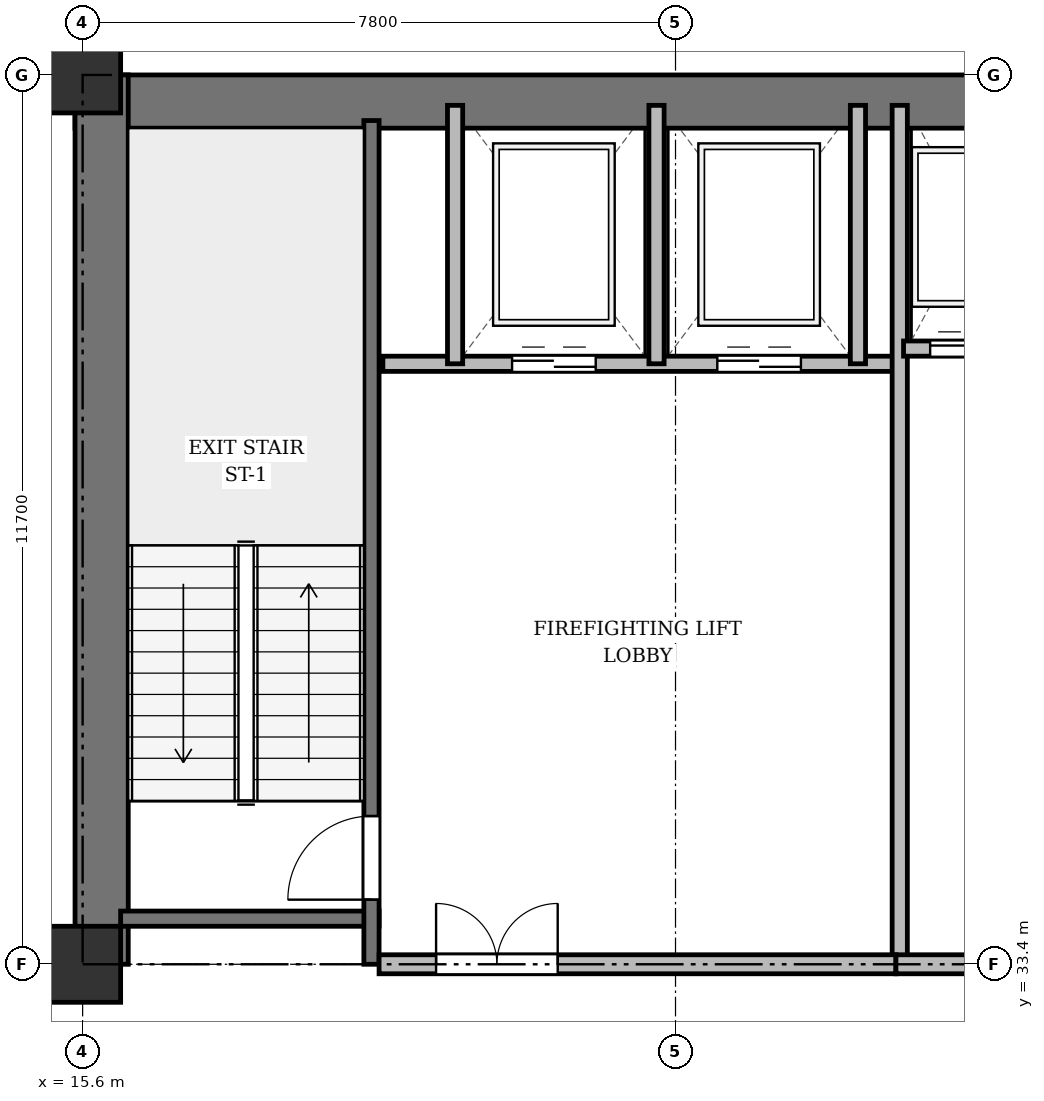
"""IFC4 building model, lengths in metres.
Left out: names, types, materials, properties, quantities, classifications, styles, units other than length and angle.
Written with IfcOpenShell. Run it as: python <this file> out.ifc"""

import sys

from ifc_helpers import new_model, si_unit, direction, frame, frame_2d, origin, origin_2d, place, context, subcontext, project, spatial, rectangle, extrude, source, transform, mapped, element, fill, save


model = new_model("IFC4")
c1 = context("Model", 3, precision=1e-05, world=origin(), true_north=direction((0.0, 1.0)))
c2 = subcontext(c1, "Body", "Model", "MODEL_VIEW")
j1 = project(units=[si_unit("LENGTHUNIT", "METRE"), si_unit("PLANEANGLEUNIT", "RADIAN")], contexts=[c1])
p1 = place(None, origin())
s1 = spatial("IfcSite", under=j1, at=p1, CompositionType="ELEMENT")
p2 = place(p1, origin())
s2 = spatial("IfcBuilding", under=s1, at=p2, CompositionType="ELEMENT")
p3 = place(p2, frame((0.0, 0.0, 14.2)))
s3 = spatial("IfcBuildingStorey", under=s2, at=p3, CompositionType="ELEMENT", Elevation=14.2)
m1 = source(origin(), c2, "Body", "SweptSolid", [
    extrude(rectangle(XDim=1.0, YDim=1.0, at=origin_2d()), origin(), (0.0, 0.0, 1.0), 4.5),
])
for number, where, z_axis, x_axis in (
    (1, (15.6, 33.4, 0.0), (0.0, 0.0, 1.0), (1.0, 0.0, 0.0)),
    (2, (15.6, 45.1, 0.0), (0.0, 0.0, 1.0), (1.0, 0.0, 0.0)),
):
    element("IfcColumn", number, at=place(p3, frame(where, z_axis=z_axis, x_axis=x_axis)), inside=s3, PredefinedType="COLUMN", context=c2, shape_type="MappedRepresentation", body=[
        mapped(m1, transform((0.0, 0.0, 0.0), x_axis=(1.0, 0.0, 0.0), y_axis=(0.0, 1.0, 0.0), z_axis=(0.0, 0.0, 1.0), scale=1.0)),
    ])
p4 = place(p3, frame((15.5, 44.75, 0.0), z_axis=(0.0, 0.0, 1.0), x_axis=(1.0, 0.0, 0.0)))
e3 = element("IfcWall", 3, at=p4, inside=s3, PredefinedType="SHEAR", context=c2, shape_type="SweptSolid", body=[
    extrude(rectangle(XDim=43.4, YDim=0.7, at=frame_2d((21.7, 0.0))), origin(), (0.0, 0.0, 1.0), 4.15),
])
p5 = place(p3, frame((15.85, 33.4, 0.0), z_axis=(0.0, 0.0, 1.0), x_axis=(0.0, 1.0, 0.0)))
e4 = element("IfcWall", 4, at=p5, inside=s3, PredefinedType="SHEAR", context=c2, shape_type="SweptSolid", body=[
    extrude(rectangle(XDim=11.7, YDim=0.7, at=frame_2d((5.85, 0.0))), origin(), (0.0, 0.0, 1.0), 4.15),
])
p6 = place(p3, frame((16.1, 34.0, 0.0), z_axis=(0.0, 0.0, 1.0), x_axis=(1.0, 0.0, 0.0)))
e5 = element("IfcWall", 5, at=p6, inside=s3, PredefinedType="SHEAR", context=c2, shape_type="SweptSolid", body=[
    extrude(rectangle(XDim=3.4, YDim=0.2, at=frame_2d((1.7, 0.0))), origin(), (0.0, 0.0, 1.0), 4.15),
])
p7 = place(p3, frame((19.4, 33.4, 0.0), z_axis=(0.0, 0.0, 1.0), x_axis=(0.0, 1.0, 0.0)))
e6 = element("IfcWall", 6, at=p7, inside=s3, PredefinedType="SHEAR", context=c2, shape_type="SweptSolid", body=[
    extrude(rectangle(XDim=11.1, YDim=0.2, at=frame_2d((5.55, 0.0))), origin(), (0.0, 0.0, 1.0), 4.15),
])
p8 = place(p7, frame((0.85, 0.0, 0.0)))
e7 = element("IfcOpeningElement", 7, at=p8, cuts=e6, PredefinedType="OPENING", context=c2, shape_type="SweptSolid", body=[
    extrude(rectangle(XDim=1.1, YDim=2.15, at=frame_2d((0.55, 1.075))), frame((0.0, 0.11, 0.0), z_axis=(0.0, -1.0, 0.0), x_axis=(1.0, 0.0, 0.0)), (0.0, 0.0, 1.0), 0.22),
])
p9 = place(p3, frame((19.55, 41.3, 0.0), z_axis=(0.0, 0.0, 1.0), x_axis=(1.0, 0.0, 0.0)))
e8 = element("IfcWall", 8, at=p9, inside=s3, PredefinedType="SOLIDWALL", context=c2, shape_type="SweptSolid", body=[
    extrude(rectangle(XDim=6.75, YDim=0.2, at=frame_2d((3.375, 0.0))), origin(), (0.0, 0.0, 1.0), 4.15),
])
p10 = place(p9, frame((1.7, 0.0, 0.0)))
e9 = element("IfcOpeningElement", 9, at=p10, cuts=e8, PredefinedType="OPENING", context=c2, shape_type="SweptSolid", body=[
    extrude(rectangle(XDim=1.1, YDim=2.15, at=frame_2d((0.55, 1.075))), frame((0.0, 0.11, 0.0), z_axis=(0.0, -1.0, 0.0), x_axis=(1.0, 0.0, 0.0)), (0.0, 0.0, 1.0), 0.22),
])
p11 = place(p9, frame((4.4, 0.0, 0.0)))
e10 = element("IfcOpeningElement", 10, at=p11, cuts=e8, PredefinedType="OPENING", context=c2, shape_type="SweptSolid", body=[
    extrude(rectangle(XDim=1.1, YDim=2.15, at=frame_2d((0.55, 1.075))), frame((0.0, 0.11, 0.0), z_axis=(0.0, -1.0, 0.0), x_axis=(1.0, 0.0, 0.0)), (0.0, 0.0, 1.0), 0.22),
])
for number, where, z_axis, x_axis in (
    (11, (20.5, 41.3, 0.0), (0.0, 0.0, 1.0), (0.0, 1.0, 0.0)),
    (12, (23.15, 41.3, 0.0), (0.0, 0.0, 1.0), (0.0, 1.0, 0.0)),
    (13, (25.8, 41.3, 0.0), (0.0, 0.0, 1.0), (0.0, 1.0, 0.0)),
):
    element("IfcWall", number, at=place(p3, frame(where, z_axis=z_axis, x_axis=x_axis)), inside=s3, PredefinedType="SOLIDWALL", context=c2, shape_type="SweptSolid", body=[
        extrude(rectangle(XDim=3.4, YDim=0.2, at=frame_2d((1.7, 0.0))), origin(), (0.0, 0.0, 1.0), 4.15),
    ])
p12 = place(p3, frame((26.35, 33.4, 0.0), z_axis=(0.0, 0.0, 1.0), x_axis=(0.0, 1.0, 0.0)))
e14 = element("IfcWall", 14, at=p12, inside=s3, PredefinedType="SOLIDWALL", context=c2, shape_type="SweptSolid", body=[
    extrude(rectangle(XDim=11.3, YDim=0.2, at=frame_2d((5.65, 0.0))), origin(), (0.0, 0.0, 1.0), 3.05),
])
p13 = place(p3, frame((19.5, 33.4, 0.0), z_axis=(0.0, 0.0, 1.0), x_axis=(1.0, 0.0, 0.0)))
e15 = element("IfcWall", 15, at=p13, inside=s3, PredefinedType="PARTITIONING", context=c2, shape_type="SweptSolid", body=[
    extrude(rectangle(XDim=6.8, YDim=0.25, at=frame_2d((3.4, 0.0))), origin(), (0.0, 0.0, 1.0), 3.05),
])
p14 = place(p13, frame((0.75, 0.0, 0.0)))
e16 = element("IfcOpeningElement", 16, at=p14, cuts=e15, PredefinedType="OPENING", context=c2, shape_type="SweptSolid", body=[
    extrude(rectangle(XDim=1.6, YDim=2.2, at=frame_2d((0.8, 1.1))), frame((0.0, 0.135, 0.0), z_axis=(0.0, -1.0, 0.0), x_axis=(1.0, 0.0, 0.0)), (0.0, 0.0, 1.0), 0.27),
])
p15 = place(p3, frame((26.4, 41.5, 0.0), z_axis=(0.0, 0.0, 1.0), x_axis=(1.0, 0.0, 0.0)))
e17 = element("IfcWall", 17, at=p15, inside=s3, PredefinedType="SOLIDWALL", context=c2, shape_type="SweptSolid", body=[
    extrude(rectangle(XDim=6.95, YDim=0.2, at=frame_2d((3.475, 0.0))), origin(), (0.0, 0.0, 1.0), 4.15),
])
p16 = place(p15, frame((0.35, 0.0, 0.0)))
e18 = element("IfcOpeningElement", 18, at=p16, cuts=e17, PredefinedType="OPENING", context=c2, shape_type="SweptSolid", body=[
    extrude(rectangle(XDim=1.05, YDim=2.15, at=frame_2d((0.525, 1.075))), frame((0.0, 0.11, 0.0), z_axis=(0.0, -1.0, 0.0), x_axis=(1.0, 0.0, 0.0)), (0.0, 0.0, 1.0), 0.22),
])
p17 = place(p15, frame((2.05, 0.0, 0.0)))
e19 = element("IfcOpeningElement", 19, at=p17, cuts=e17, PredefinedType="OPENING", context=c2, shape_type="SweptSolid", body=[
    extrude(rectangle(XDim=1.05, YDim=2.15, at=frame_2d((0.525, 1.075))), frame((0.0, 0.11, 0.0), z_axis=(0.0, -1.0, 0.0), x_axis=(1.0, 0.0, 0.0)), (0.0, 0.0, 1.0), 0.22),
])
p18 = place(p15, frame((3.75, 0.0, 0.0)))
e20 = element("IfcOpeningElement", 20, at=p18, cuts=e17, PredefinedType="OPENING", context=c2, shape_type="SweptSolid", body=[
    extrude(rectangle(XDim=1.05, YDim=2.15, at=frame_2d((0.525, 1.075))), frame((0.0, 0.11, 0.0), z_axis=(0.0, -1.0, 0.0), x_axis=(1.0, 0.0, 0.0)), (0.0, 0.0, 1.0), 0.22),
])
p19 = place(p15, frame((5.45, 0.0, 0.0)))
e21 = element("IfcOpeningElement", 21, at=p19, cuts=e17, PredefinedType="OPENING", context=c2, shape_type="SweptSolid", body=[
    extrude(rectangle(XDim=1.05, YDim=2.15, at=frame_2d((0.525, 1.075))), frame((0.0, 0.11, 0.0), z_axis=(0.0, -1.0, 0.0), x_axis=(1.0, 0.0, 0.0)), (0.0, 0.0, 1.0), 0.22),
])
p20 = place(p3, frame((26.3, 33.4, 0.0), z_axis=(0.0, 0.0, 1.0), x_axis=(1.0, 0.0, 0.0)))
e22 = element("IfcWall", 22, at=p20, inside=s3, PredefinedType="PARTITIONING", context=c2, shape_type="SweptSolid", body=[
    extrude(rectangle(XDim=20.85, YDim=0.25, at=frame_2d((10.425, 0.0))), origin(), (0.0, 0.0, 1.0), 3.05),
])
p21 = place(p20, frame((9.2, 0.0, 0.0)))
e23 = element("IfcOpeningElement", 23, at=p21, cuts=e22, PredefinedType="OPENING", context=c2, shape_type="SweptSolid", body=[
    extrude(rectangle(XDim=1.6, YDim=2.2, at=frame_2d((0.8, 1.1))), frame((0.0, 0.135, 0.0), z_axis=(0.0, -1.0, 0.0), x_axis=(1.0, 0.0, 0.0)), (0.0, 0.0, 1.0), 0.27),
])
p22 = place(p3, frame((-1.75, 33.4, 0.0), z_axis=(0.0, 0.0, 1.0), x_axis=(1.0, 0.0, 0.0)))
e24 = element("IfcWall", 24, at=p22, inside=s3, PredefinedType="PARTITIONING", context=c2, shape_type="SweptSolid", body=[
    extrude(rectangle(XDim=17.55, YDim=0.15, at=frame_2d((8.775, 0.0))), origin(), (0.0, 0.0, 1.0), 3.05),
])
p23 = place(p22, frame((10.868, 0.0, 0.0)))
e25 = element("IfcOpeningElement", 25, at=p23, cuts=e24, PredefinedType="OPENING", context=c2, shape_type="SweptSolid", body=[
    extrude(rectangle(XDim=1.6, YDim=2.2, at=frame_2d((0.8, 1.1))), frame((0.0, 0.085, 0.0), z_axis=(0.0, -1.0, 0.0), x_axis=(1.0, 0.0, 0.0)), (0.0, 0.0, 1.0), 0.17),
])
m2 = source(origin(), c2, "Body", "SweptSolid", [
    extrude(rectangle(XDim=1.1, YDim=2.15, at=frame_2d((0.55, 1.075))), frame((0.0, 0.025, 0.0), z_axis=(0.0, -1.0, 0.0), x_axis=(1.0, 0.0, 0.0)), (0.0, 0.0, 1.0), 0.05),
])
p24 = place(p8, origin())
e26 = element("IfcDoor", 26, at=p24, inside=s3, OperationType="SINGLE_SWING_LEFT", PredefinedType="DOOR", context=c2, shape_type="MappedRepresentation", body=[
    mapped(m2, transform((0.0, 0.0, 0.0), x_axis=(1.0, 0.0, 0.0), y_axis=(0.0, 1.0, 0.0), z_axis=(0.0, 0.0, 1.0), scale=1.0)),
])
fill(e7, e26)
p25 = place(p10, origin())
e27 = element("IfcDoor", 27, at=p25, inside=s3, OperationType="DOUBLE_DOOR_SLIDING", PredefinedType="DOOR", context=c2, shape_type="MappedRepresentation", body=[
    mapped(m2, transform((0.0, 0.0, 0.0), x_axis=(1.0, 0.0, 0.0), y_axis=(0.0, 1.0, 0.0), z_axis=(0.0, 0.0, 1.0), scale=1.0)),
])
fill(e9, e27)
p26 = place(p11, origin())
e28 = element("IfcDoor", 28, at=p26, inside=s3, OperationType="DOUBLE_DOOR_SLIDING", PredefinedType="DOOR", context=c2, shape_type="MappedRepresentation", body=[
    mapped(m2, transform((0.0, 0.0, 0.0), x_axis=(1.0, 0.0, 0.0), y_axis=(0.0, 1.0, 0.0), z_axis=(0.0, 0.0, 1.0), scale=1.0)),
])
fill(e10, e28)
m3 = source(origin(), c2, "Body", "SweptSolid", [
    extrude(rectangle(XDim=1.6, YDim=2.2, at=frame_2d((0.8, 1.1))), frame((0.0, 0.025, 0.0), z_axis=(0.0, -1.0, 0.0), x_axis=(1.0, 0.0, 0.0)), (0.0, 0.0, 1.0), 0.05),
])
p27 = place(p14, origin())
e29 = element("IfcDoor", 29, at=p27, inside=s3, OperationType="DOUBLE_DOOR_SINGLE_SWING", PredefinedType="DOOR", context=c2, shape_type="MappedRepresentation", body=[
    mapped(m3, transform((0.0, 0.0, 0.0), x_axis=(1.0, 0.0, 0.0), y_axis=(0.0, 1.0, 0.0), z_axis=(0.0, 0.0, 1.0), scale=1.0)),
])
fill(e16, e29)
m4 = source(origin(), c2, "Body", "SweptSolid", [
    extrude(rectangle(XDim=1.05, YDim=2.15, at=frame_2d((0.525, 1.075))), frame((0.0, 0.025, 0.0), z_axis=(0.0, -1.0, 0.0), x_axis=(1.0, 0.0, 0.0)), (0.0, 0.0, 1.0), 0.05),
])
p28 = place(p16, origin())
e30 = element("IfcDoor", 30, at=p28, inside=s3, OperationType="DOUBLE_DOOR_SLIDING", PredefinedType="DOOR", context=c2, shape_type="MappedRepresentation", body=[
    mapped(m4, transform((0.0, 0.0, 0.0), x_axis=(1.0, 0.0, 0.0), y_axis=(0.0, 1.0, 0.0), z_axis=(0.0, 0.0, 1.0), scale=1.0)),
])
fill(e18, e30)
save(model, sys.argv[1])
